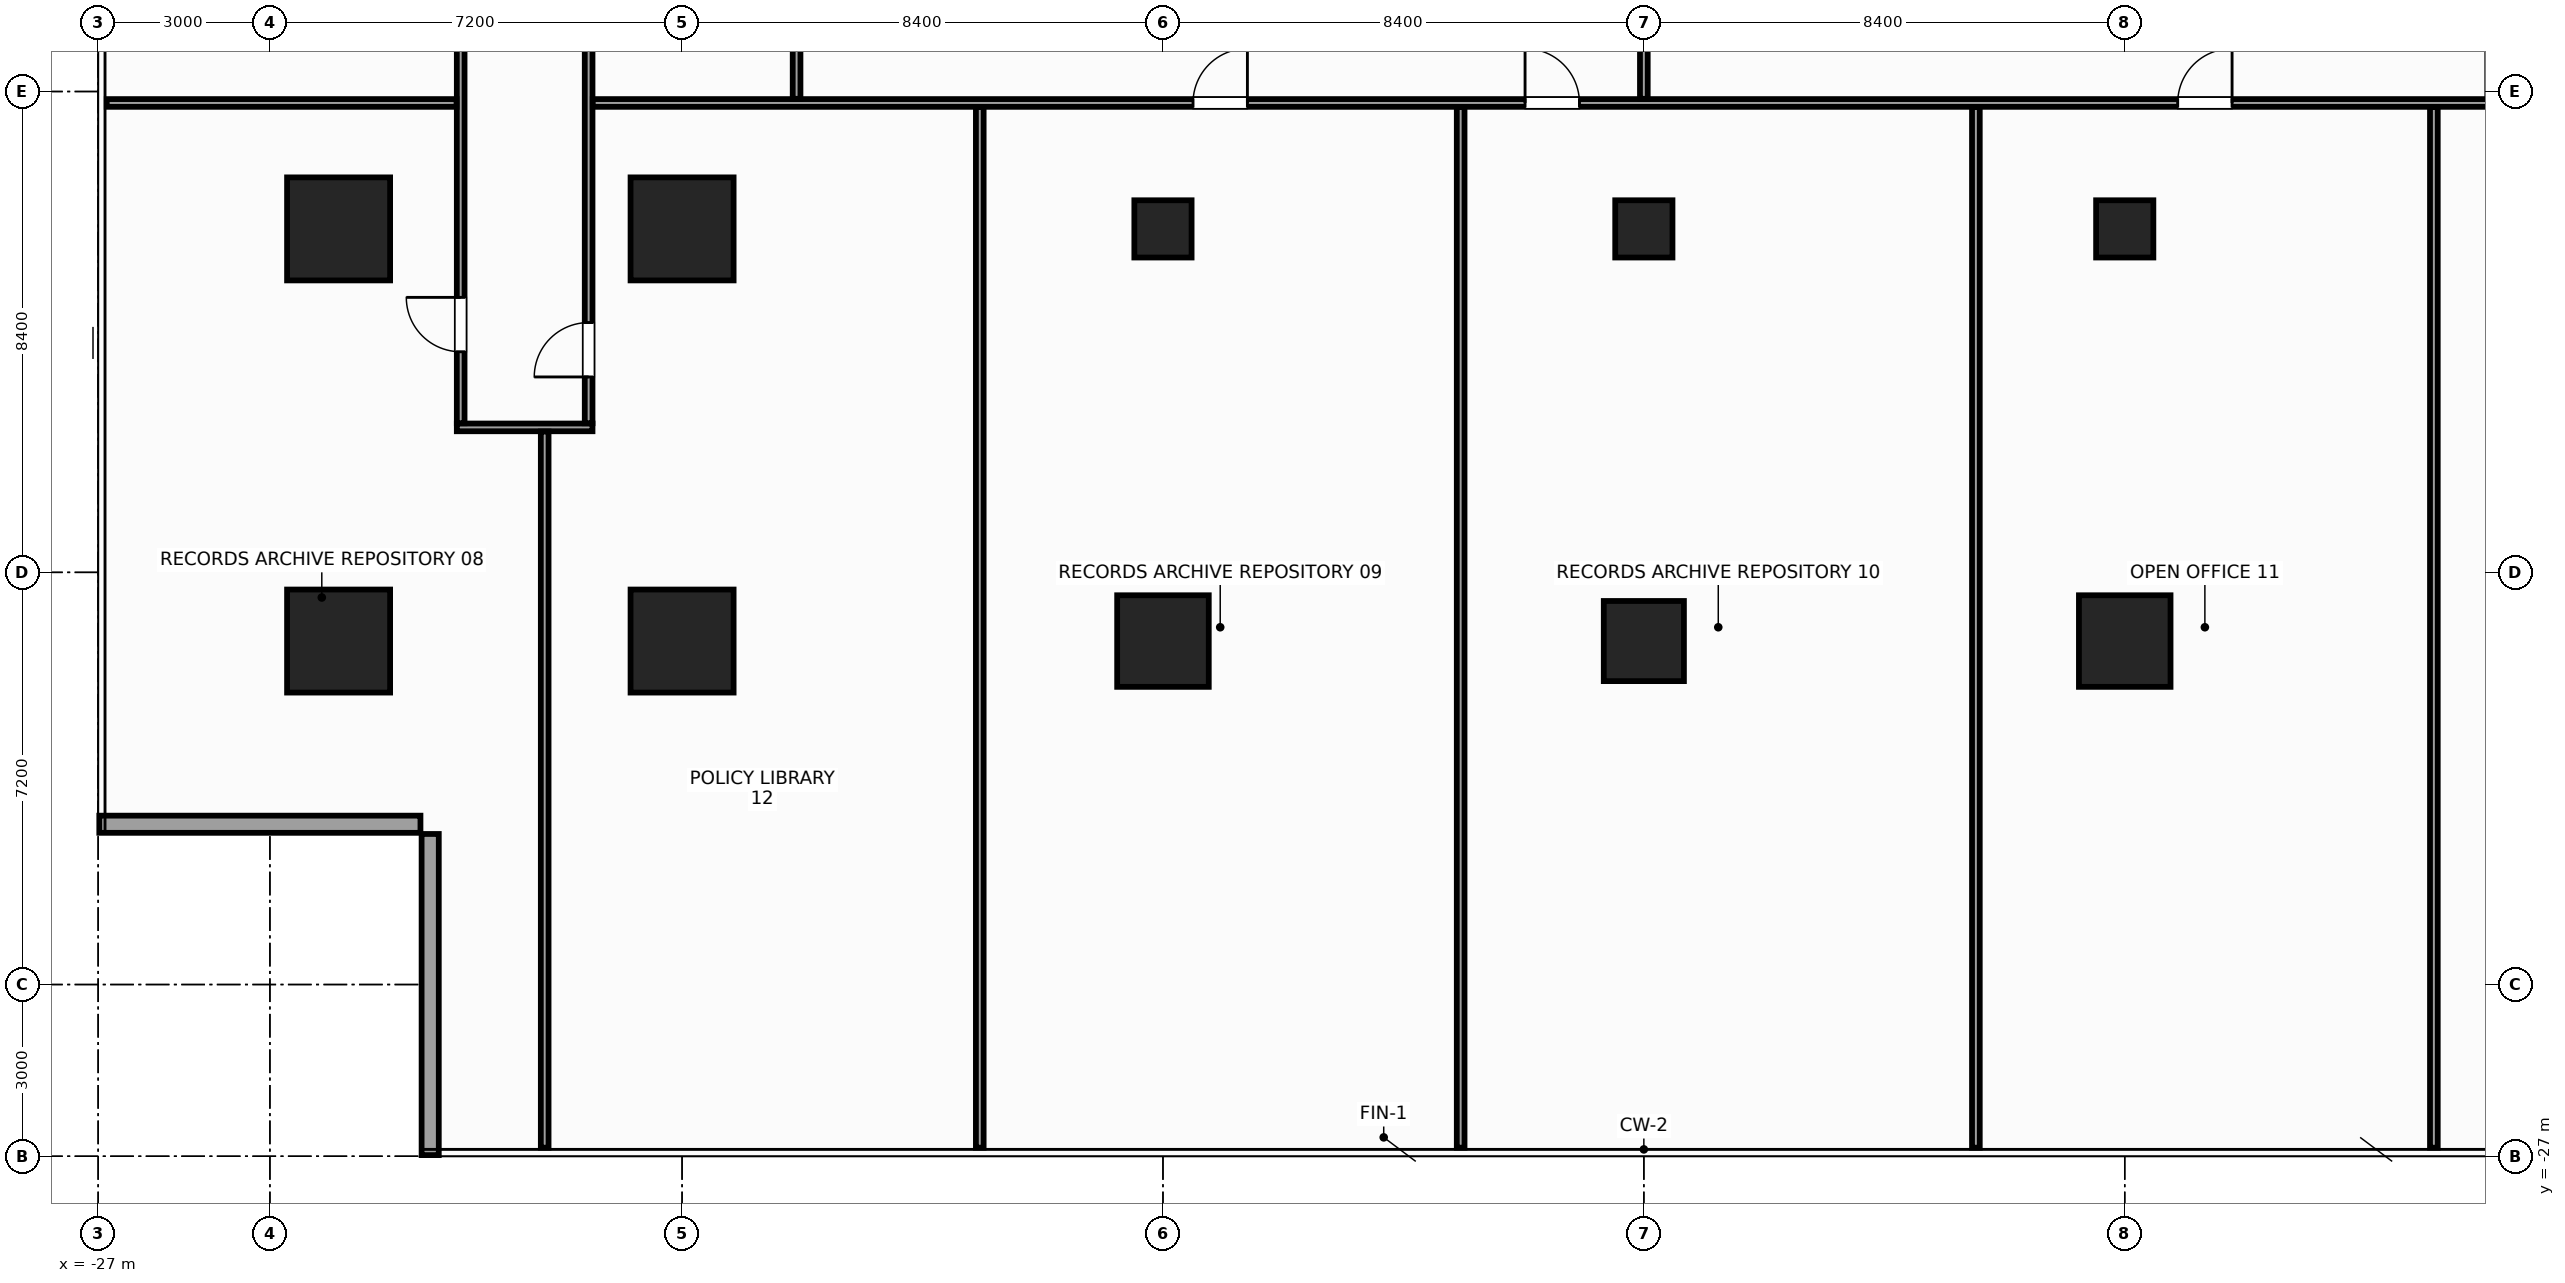
"""IFC4 building model, lengths in metres.
Left out: names, types, materials, properties, quantities, classifications, styles, units other than length and angle.
Written with IfcOpenShell. Run it as: python <this file> out.ifc"""

import sys

from ifc_helpers import new_model, si_unit, direction, frame, frame_2d, origin, origin_2d, place, context, subcontext, project, spatial, rectangle, hollow_rectangle, extrude, source, transform, mapped, element, fill, save


model = new_model("IFC4")
c1 = context("Model", 3, precision=1e-05, world=origin(), true_north=direction((0.0, 1.0)))
c2 = subcontext(c1, "Body", "Model", "MODEL_VIEW")
j1 = project(units=[si_unit("LENGTHUNIT", "METRE"), si_unit("PLANEANGLEUNIT", "RADIAN")], contexts=[c1])
p1 = place(None, origin())
s1 = spatial("IfcSite", under=j1, at=p1, CompositionType="ELEMENT")
p2 = place(p1, origin())
s2 = spatial("IfcBuilding", under=s1, at=p2, CompositionType="ELEMENT")
p3 = place(p2, frame((0.0, 0.0, 34.4)))
s3 = spatial("IfcBuildingStorey", under=s2, at=p3, CompositionType="ELEMENT", Elevation=34.4)
m1 = source(origin(), c2, "Body", "SweptSolid", [
    extrude(rectangle(XDim=1.8, YDim=1.8, at=origin_2d()), origin(), (0.0, 0.0, 1.0), 3.6),
])
for number, where, z_axis, x_axis in (
    (1, (-16.8, -18.0, 0.0), (0.0, 0.0, 1.0), (1.0, 0.0, 0.0)),
    (2, (-16.8, -10.8, 0.0), (0.0, 0.0, 1.0), (1.0, 0.0, 0.0)),
    (3, (-22.8, -18.0, 0.0), (0.0, 0.0, 1.0), (1.0, 0.0, 0.0)),
    (4, (-22.8, -10.8, 0.0), (0.0, 0.0, 1.0), (1.0, 0.0, 0.0)),
):
    element("IfcColumn", number, at=place(p3, frame(where, z_axis=z_axis, x_axis=x_axis)), inside=s3, PredefinedType="COLUMN", context=c2, shape_type="MappedRepresentation", body=[
        mapped(m1, transform((0.0, 0.0, 0.0), x_axis=(1.0, 0.0, 0.0), y_axis=(0.0, 1.0, 0.0), z_axis=(0.0, 0.0, 1.0), scale=1.0)),
    ])
m2 = source(origin(), c2, "Body", "SweptSolid", [
    extrude(rectangle(XDim=1.6, YDim=1.6, at=origin_2d()), origin(), (0.0, 0.0, 1.0), 3.6),
])
p4 = place(p3, frame((-8.4, -18.0, 0.0), z_axis=(0.0, 0.0, 1.0), x_axis=(1.0, 0.0, 0.0)))
e5 = element("IfcColumn", 5, at=p4, inside=s3, PredefinedType="COLUMN", context=c2, shape_type="MappedRepresentation", body=[
    mapped(m2, transform((0.0, 0.0, 0.0), x_axis=(1.0, 0.0, 0.0), y_axis=(0.0, 1.0, 0.0), z_axis=(0.0, 0.0, 1.0), scale=1.0)),
])
m3 = source(origin(), c2, "Body", "SweptSolid", [
    extrude(hollow_rectangle(XDim=1.0, YDim=1.0, WallThickness=0.045, at=origin_2d()), origin(), (0.0, 0.0, 1.0), 3.6),
])
p5 = place(p3, frame((-8.4, -10.8, 0.0), z_axis=(0.0, 0.0, 1.0), x_axis=(1.0, 0.0, 0.0)))
e6 = element("IfcColumn", 6, at=p5, inside=s3, PredefinedType="COLUMN", context=c2, shape_type="MappedRepresentation", body=[
    mapped(m3, transform((0.0, 0.0, 0.0), x_axis=(1.0, 0.0, 0.0), y_axis=(0.0, 1.0, 0.0), z_axis=(0.0, 0.0, 1.0), scale=1.0)),
])
p6 = place(p3, frame((8.4, -18.0, 0.0), z_axis=(0.0, 0.0, 1.0), x_axis=(1.0, 0.0, 0.0)))
e7 = element("IfcColumn", 7, at=p6, inside=s3, PredefinedType="COLUMN", context=c2, shape_type="MappedRepresentation", body=[
    mapped(m2, transform((0.0, 0.0, 0.0), x_axis=(1.0, 0.0, 0.0), y_axis=(0.0, 1.0, 0.0), z_axis=(0.0, 0.0, 1.0), scale=1.0)),
])
p7 = place(p3, frame((8.4, -10.8, 0.0), z_axis=(0.0, 0.0, 1.0), x_axis=(1.0, 0.0, 0.0)))
e8 = element("IfcColumn", 8, at=p7, inside=s3, PredefinedType="COLUMN", context=c2, shape_type="MappedRepresentation", body=[
    mapped(m3, transform((0.0, 0.0, 0.0), x_axis=(1.0, 0.0, 0.0), y_axis=(0.0, 1.0, 0.0), z_axis=(0.0, 0.0, 1.0), scale=1.0)),
])
m4 = source(origin(), c2, "Body", "SweptSolid", [
    extrude(rectangle(XDim=1.4, YDim=1.4, at=origin_2d()), origin(), (0.0, 0.0, 1.0), 3.6),
])
p8 = place(p3, frame((0.0, -18.0, 0.0), z_axis=(0.0, 0.0, 1.0), x_axis=(1.0, 0.0, 0.0)))
e9 = element("IfcColumn", 9, at=p8, inside=s3, PredefinedType="COLUMN", context=c2, shape_type="MappedRepresentation", body=[
    mapped(m4, transform((0.0, 0.0, 0.0), x_axis=(1.0, 0.0, 0.0), y_axis=(0.0, 1.0, 0.0), z_axis=(0.0, 0.0, 1.0), scale=1.0)),
])
m5 = source(origin(), c2, "Body", "SweptSolid", [
    extrude(rectangle(XDim=1.0, YDim=1.0, at=origin_2d()), origin(), (0.0, 0.0, 1.0), 3.6),
])
p9 = place(p3, frame((0.0, -10.8, 0.0), z_axis=(0.0, 0.0, 1.0), x_axis=(1.0, 0.0, 0.0)))
e10 = element("IfcColumn", 10, at=p9, inside=s3, PredefinedType="COLUMN", context=c2, shape_type="MappedRepresentation", body=[
    mapped(m5, transform((0.0, 0.0, 0.0), x_axis=(1.0, 0.0, 0.0), y_axis=(0.0, 1.0, 0.0), z_axis=(0.0, 0.0, 1.0), scale=1.0)),
])
m6 = source(origin(), c2, "Body", "SweptSolid", [
    extrude(rectangle(XDim=5.61, YDim=0.3, at=frame_2d((2.805, 0.0))), origin(), (0.0, 0.0, 1.0), 2.74),
])
for number, where, z_axis, x_axis in (
    (11, (-26.98, -21.2, 0.0), (0.0, 0.0, 1.0), (1.0, 0.0, 0.0)),
    (12, (-21.2, -21.37, 0.0), (0.0, 0.0, 1.0), (0.0, -1.0, 0.0)),
):
    element("IfcWall", number, at=place(p3, frame(where, z_axis=z_axis, x_axis=x_axis)), inside=s3, PredefinedType="STANDARD", context=c2, shape_type="MappedRepresentation", body=[
        mapped(m6, transform((0.0, 0.0, 0.0), x_axis=(1.0, 0.0, 0.0), y_axis=(0.0, 1.0, 0.0), z_axis=(0.0, 0.0, 1.0), scale=1.0)),
    ])
m7 = source(origin(), c2, "Body", "SweptSolid", [
    extrude(rectangle(XDim=2.37, YDim=0.135, at=frame_2d((1.185, 0.0))), origin(), (0.0, 0.0, 1.0), 3.045),
])
p10 = place(p3, frame((-20.735, -14.268, 0.0), z_axis=(0.0, 0.0, 1.0), x_axis=(1.0, 0.0, 0.0)))
e13 = element("IfcWall", 13, at=p10, inside=s3, PredefinedType="PARTITIONING", context=c2, shape_type="MappedRepresentation", body=[
    mapped(m7, transform((0.0, 0.0, 0.0), x_axis=(1.0, 0.0, 0.0), y_axis=(0.0, 1.0, 0.0), z_axis=(0.0, 0.0, 1.0), scale=1.0)),
])
m8 = source(origin(), c2, "Body", "SweptSolid", [
    extrude(rectangle(XDim=24.123, YDim=0.135, at=frame_2d((12.061, 0.0))), origin(), (0.0, 0.0, 1.0), 2.745),
])
p11 = place(p3, frame((-20.667, -14.195, 0.0), z_axis=(0.0, 0.0, 1.0), x_axis=(0.0, 1.0, 0.0)))
e14 = element("IfcWall", 14, at=p11, inside=s3, PredefinedType="PARTITIONING", context=c2, shape_type="MappedRepresentation", body=[
    mapped(m8, transform((0.0, 0.0, 0.0), x_axis=(1.0, 0.0, 0.0), y_axis=(0.0, 1.0, 0.0), z_axis=(0.0, 0.0, 1.0), scale=1.0)),
])
p12 = place(p11, frame((15.238, 0.0, 0.0)))
e15 = element("IfcOpeningElement", 15, at=p12, cuts=e14, PredefinedType="OPENING", context=c2, shape_type="SweptSolid", body=[
    extrude(rectangle(XDim=0.95, YDim=2.15, at=frame_2d((0.475, 1.075))), frame((0.0, 0.08, 0.0), z_axis=(0.0, -1.0, 0.0), x_axis=(1.0, 0.0, 0.0)), (0.0, 0.0, 1.0), 0.159),
])
p13 = place(p11, frame((1.249, 0.0, 0.0)))
e16 = element("IfcOpeningElement", 16, at=p13, cuts=e14, PredefinedType="OPENING", context=c2, shape_type="SweptSolid", body=[
    extrude(rectangle(XDim=0.95, YDim=2.15, at=frame_2d((0.475, 1.075))), frame((0.0, 0.08, 0.0), z_axis=(0.0, -1.0, 0.0), x_axis=(1.0, 0.0, 0.0)), (0.0, 0.0, 1.0), 0.159),
])
m9 = source(origin(), c2, "Body", "SweptSolid", [
    extrude(rectangle(XDim=21.995, YDim=0.135, at=frame_2d((10.998, 0.0))), origin(), (0.0, 0.0, 1.0), 2.745),
])
p14 = place(p3, frame((-18.433, -14.195, 0.0), z_axis=(0.0, 0.0, 1.0), x_axis=(0.0, 1.0, 0.0)))
e17 = element("IfcWall", 17, at=p14, inside=s3, PredefinedType="PARTITIONING", context=c2, shape_type="MappedRepresentation", body=[
    mapped(m9, transform((0.0, 0.0, 0.0), x_axis=(1.0, 0.0, 0.0), y_axis=(0.0, 1.0, 0.0), z_axis=(0.0, 0.0, 1.0), scale=1.0)),
])
p15 = place(p14, frame((0.809, 0.0, 0.0)))
e18 = element("IfcOpeningElement", 18, at=p15, cuts=e17, PredefinedType="OPENING", context=c2, shape_type="SweptSolid", body=[
    extrude(rectangle(XDim=0.95, YDim=2.15, at=frame_2d((0.475, 1.075))), frame((0.0, 0.08, 0.0), z_axis=(0.0, -1.0, 0.0), x_axis=(1.0, 0.0, 0.0)), (0.0, 0.0, 1.0), 0.159),
])
m10 = source(origin(), c2, "Body", "SweptSolid", [
    extrude(rectangle(XDim=6.11, YDim=0.135, at=frame_2d((3.055, 0.0))), origin(), (0.0, 0.0, 1.0), 2.745),
])
p16 = place(p3, frame((-26.85, -8.6, 0.0), z_axis=(0.0, 0.0, 1.0), x_axis=(1.0, 0.0, 0.0)))
e19 = element("IfcWall", 19, at=p16, inside=s3, PredefinedType="PARTITIONING", context=c2, shape_type="MappedRepresentation", body=[
    mapped(m10, transform((0.0, 0.0, 0.0), x_axis=(1.0, 0.0, 0.0), y_axis=(0.0, 1.0, 0.0), z_axis=(0.0, 0.0, 1.0), scale=1.0)),
])
m11 = source(origin(), c2, "Body", "SweptSolid", [
    extrude(rectangle(XDim=36.72, YDim=0.135, at=frame_2d((18.36, 0.0))), origin(), (0.0, 0.0, 1.0), 2.745),
])
p17 = place(p3, frame((-18.36, -8.6, 0.0), z_axis=(0.0, 0.0, 1.0), x_axis=(1.0, 0.0, 0.0)))
e20 = element("IfcWall", 20, at=p17, inside=s3, PredefinedType="PARTITIONING", context=c2, shape_type="MappedRepresentation", body=[
    mapped(m11, transform((0.0, 0.0, 0.0), x_axis=(1.0, 0.0, 0.0), y_axis=(0.0, 1.0, 0.0), z_axis=(0.0, 0.0, 1.0), scale=1.0)),
])
p18 = place(p17, frame((10.485, 0.0, 0.0)))
e21 = element("IfcOpeningElement", 21, at=p18, cuts=e20, PredefinedType="OPENING", context=c2, shape_type="SweptSolid", body=[
    extrude(rectangle(XDim=0.95, YDim=2.15, at=frame_2d((0.475, 1.075))), frame((0.0, 0.08, 0.0), z_axis=(0.0, -1.0, 0.0), x_axis=(1.0, 0.0, 0.0)), (0.0, 0.0, 1.0), 0.159),
])
p19 = place(p17, frame((16.285, 0.0, 0.0)))
e22 = element("IfcOpeningElement", 22, at=p19, cuts=e20, PredefinedType="OPENING", context=c2, shape_type="SweptSolid", body=[
    extrude(rectangle(XDim=0.95, YDim=2.15, at=frame_2d((0.475, 1.075))), frame((0.0, 0.08, 0.0), z_axis=(0.0, -1.0, 0.0), x_axis=(1.0, 0.0, 0.0)), (0.0, 0.0, 1.0), 0.159),
])
p20 = place(p17, frame((27.685, 0.0, 0.0)))
e23 = element("IfcOpeningElement", 23, at=p20, cuts=e20, PredefinedType="OPENING", context=c2, shape_type="SweptSolid", body=[
    extrude(rectangle(XDim=0.95, YDim=2.15, at=frame_2d((0.475, 1.075))), frame((0.0, 0.08, 0.0), z_axis=(0.0, -1.0, 0.0), x_axis=(1.0, 0.0, 0.0)), (0.0, 0.0, 1.0), 0.159),
])
m12 = source(origin(), c2, "Body", "SweptSolid", [
    extrude(rectangle(XDim=16.188, YDim=0.135, at=frame_2d((8.094, 0.0))), origin(), (0.0, 0.0, 1.0), 2.37),
])
p21 = place(p3, frame((-14.8, -8.528, 0.0), z_axis=(0.0, 0.0, 1.0), x_axis=(0.0, 1.0, 0.0)))
e24 = element("IfcWall", 24, at=p21, inside=s3, PredefinedType="PARTITIONING", context=c2, shape_type="MappedRepresentation", body=[
    mapped(m12, transform((0.0, 0.0, 0.0), x_axis=(1.0, 0.0, 0.0), y_axis=(0.0, 1.0, 0.0), z_axis=(0.0, 0.0, 1.0), scale=1.0)),
])
m13 = source(origin(), c2, "Body", "SweptSolid", [
    extrude(rectangle(XDim=8.018, YDim=0.135, at=frame_2d((4.009, 0.0))), origin(), (0.0, 0.0, 1.0), 2.745),
])
p22 = place(p3, frame((0.0, -8.528, 0.0), z_axis=(0.0, 0.0, 1.0), x_axis=(0.0, 1.0, 0.0)))
e25 = element("IfcWall", 25, at=p22, inside=s3, PredefinedType="PARTITIONING", context=c2, shape_type="MappedRepresentation", body=[
    mapped(m13, transform((0.0, 0.0, 0.0), x_axis=(1.0, 0.0, 0.0), y_axis=(0.0, 1.0, 0.0), z_axis=(0.0, 0.0, 1.0), scale=1.0)),
])
m14 = source(origin(), c2, "Body", "SweptSolid", [
    extrude(rectangle(XDim=12.51, YDim=0.135, at=frame_2d((6.255, 0.0))), origin(), (0.0, 0.0, 1.0), 2.745),
])
p23 = place(p3, frame((-19.2, -26.85, 0.0), z_axis=(0.0, 0.0, 1.0), x_axis=(0.0, 1.0, 0.0)))
e26 = element("IfcWall", 26, at=p23, inside=s3, PredefinedType="PARTITIONING", context=c2, shape_type="MappedRepresentation", body=[
    mapped(m14, transform((0.0, 0.0, 0.0), x_axis=(1.0, 0.0, 0.0), y_axis=(0.0, 1.0, 0.0), z_axis=(0.0, 0.0, 1.0), scale=1.0)),
])
m15 = source(origin(), c2, "Body", "SweptSolid", [
    extrude(rectangle(XDim=18.177, YDim=0.135, at=frame_2d((9.089, 0.0))), origin(), (0.0, 0.0, 1.0), 2.745),
])
for number, where, z_axis, x_axis in (
    (27, (-11.6, -26.85, 0.0), (0.0, 0.0, 1.0), (0.0, 1.0, 0.0)),
    (28, (-3.2, -26.85, 0.0), (0.0, 0.0, 1.0), (0.0, 1.0, 0.0)),
    (29, (5.8, -26.85, 0.0), (0.0, 0.0, 1.0), (0.0, 1.0, 0.0)),
    (30, (13.8, -26.85, 0.0), (0.0, 0.0, 1.0), (0.0, 1.0, 0.0)),
):
    element("IfcWall", number, at=place(p3, frame(where, z_axis=z_axis, x_axis=x_axis)), inside=s3, PredefinedType="PARTITIONING", context=c2, shape_type="MappedRepresentation", body=[
        mapped(m15, transform((0.0, 0.0, 0.0), x_axis=(1.0, 0.0, 0.0), y_axis=(0.0, 1.0, 0.0), z_axis=(0.0, 0.0, 1.0), scale=1.0)),
    ])
m16 = source(origin(), c2, "Body", "SweptSolid", [
    extrude(rectangle(XDim=0.95, YDim=2.15, at=frame_2d((0.475, 1.075))), frame((0.0, 0.025, 0.0), z_axis=(0.0, -1.0, 0.0), x_axis=(1.0, 0.0, 0.0)), (0.0, 0.0, 1.0), 0.05),
])
p24 = place(p13, origin())
e31 = element("IfcDoor", 31, at=p24, inside=s3, OperationType="SINGLE_SWING_RIGHT", PredefinedType="DOOR", context=c2, shape_type="MappedRepresentation", body=[
    mapped(m16, transform((0.0, 0.0, 0.0), x_axis=(1.0, 0.0, 0.0), y_axis=(0.0, 1.0, 0.0), z_axis=(0.0, 0.0, 1.0), scale=1.0)),
])
fill(e16, e31)
p25 = place(p15, origin())
e32 = element("IfcDoor", 32, at=p25, inside=s3, OperationType="SINGLE_SWING_LEFT", PredefinedType="DOOR", context=c2, shape_type="MappedRepresentation", body=[
    mapped(m16, transform((0.0, 0.0, 0.0), x_axis=(1.0, 0.0, 0.0), y_axis=(0.0, 1.0, 0.0), z_axis=(0.0, 0.0, 1.0), scale=1.0)),
])
fill(e18, e32)
p26 = place(p18, origin())
e33 = element("IfcDoor", 33, at=p26, inside=s3, OperationType="SINGLE_SWING_RIGHT", PredefinedType="DOOR", context=c2, shape_type="MappedRepresentation", body=[
    mapped(m16, transform((0.0, 0.0, 0.0), x_axis=(1.0, 0.0, 0.0), y_axis=(0.0, 1.0, 0.0), z_axis=(0.0, 0.0, 1.0), scale=1.0)),
])
fill(e21, e33)
p27 = place(p19, origin())
e34 = element("IfcDoor", 34, at=p27, inside=s3, OperationType="SINGLE_SWING_LEFT", PredefinedType="DOOR", context=c2, shape_type="MappedRepresentation", body=[
    mapped(m16, transform((0.0, 0.0, 0.0), x_axis=(1.0, 0.0, 0.0), y_axis=(0.0, 1.0, 0.0), z_axis=(0.0, 0.0, 1.0), scale=1.0)),
])
fill(e22, e34)
p28 = place(p20, origin())
e35 = element("IfcDoor", 35, at=p28, inside=s3, OperationType="SINGLE_SWING_RIGHT", PredefinedType="DOOR", context=c2, shape_type="MappedRepresentation", body=[
    mapped(m16, transform((0.0, 0.0, 0.0), x_axis=(1.0, 0.0, 0.0), y_axis=(0.0, 1.0, 0.0), z_axis=(0.0, 0.0, 1.0), scale=1.0)),
])
fill(e23, e35)
save(model, sys.argv[1])
